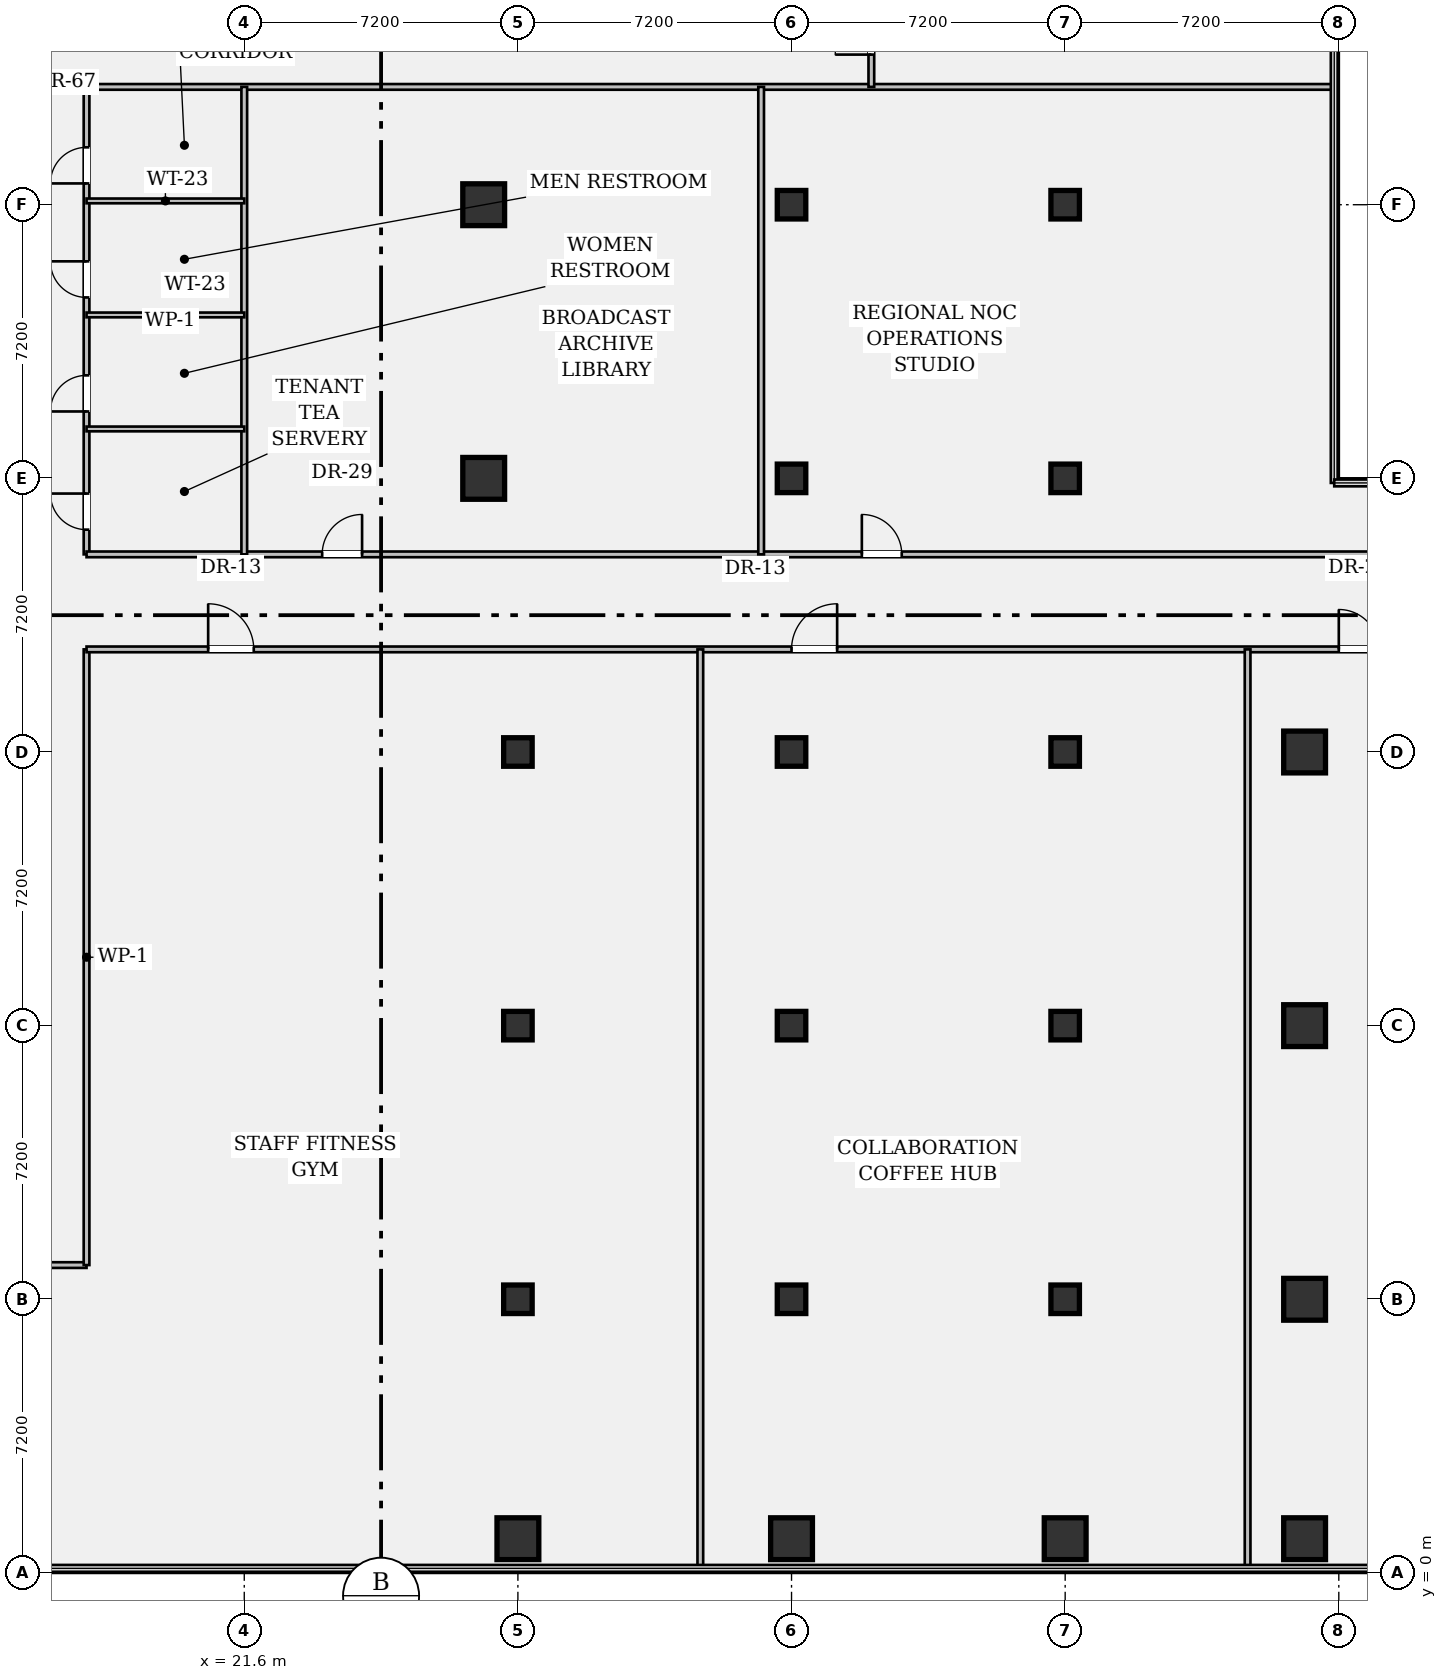
"""IFC4 building model, lengths in metres.
Left out: names, types, materials, properties, quantities, classifications, styles, units other than length and angle.
Written with IfcOpenShell. Run it as: python <this file> out.ifc"""

import sys

from ifc_helpers import new_model, si_unit, direction, frame, frame_2d, origin, origin_2d, place, context, subcontext, project, spatial, rectangle, hollow_rectangle, extrude, element, fill, save


model = new_model("IFC4")
c1 = context("Model", 3, precision=1e-05, world=origin(), true_north=direction((0.0, 1.0)))
c2 = subcontext(c1, "Body", "Model", "MODEL_VIEW")
j1 = project(units=[si_unit("LENGTHUNIT", "METRE"), si_unit("PLANEANGLEUNIT", "RADIAN")], contexts=[c1])
p1 = place(None, origin())
s1 = spatial("IfcSite", under=j1, at=p1, CompositionType="ELEMENT")
p2 = place(p1, origin())
s2 = spatial("IfcBuilding", under=s1, at=p2, CompositionType="ELEMENT")
p3 = place(p2, frame((0.0, 0.0, 17.85)))
s3 = spatial("IfcBuildingStorey", under=s2, at=p3, CompositionType="ELEMENT", Elevation=17.85)
for number, where, z_axis, x_axis in (
    (1, (27.9, 28.8, 0.0), (0.0, 0.0, 1.0), (1.0, 0.0, 0.0)),
    (2, (27.9, 36.0, 0.0), (0.0, 0.0, 1.0), (1.0, 0.0, 0.0)),
    (3, (28.8, 0.9, 0.0), (0.0, 0.0, 1.0), (1.0, 0.0, 0.0)),
):
    element("IfcColumn", number, at=place(p3, frame(where, z_axis=z_axis, x_axis=x_axis)), inside=s3, PredefinedType="COLUMN", context=c2, shape_type="SweptSolid", body=[
        extrude(hollow_rectangle(XDim=1.1, YDim=1.1, WallThickness=0.07, at=origin_2d()), origin(), (0.0, 0.0, 1.0), 3.91),
    ])
for number, where, z_axis, x_axis in (
    (4, (28.8, 7.2, 0.0), (0.0, 0.0, 1.0), (1.0, 0.0, 0.0)),
    (5, (28.8, 14.4, 0.0), (0.0, 0.0, 1.0), (1.0, 0.0, 0.0)),
    (6, (28.8, 21.6, 0.0), (0.0, 0.0, 1.0), (1.0, 0.0, 0.0)),
):
    element("IfcColumn", number, at=place(p3, frame(where, z_axis=z_axis, x_axis=x_axis)), inside=s3, PredefinedType="COLUMN", context=c2, shape_type="SweptSolid", body=[
        extrude(rectangle(XDim=0.75, YDim=0.75, at=origin_2d()), origin(), (0.0, 0.0, 1.0), 3.91),
    ])
p4 = place(p3, frame((36.0, 0.9, 0.0), z_axis=(0.0, 0.0, 1.0), x_axis=(1.0, 0.0, 0.0)))
e7 = element("IfcColumn", 7, at=p4, inside=s3, PredefinedType="COLUMN", context=c2, shape_type="SweptSolid", body=[
    extrude(hollow_rectangle(XDim=1.1, YDim=1.1, WallThickness=0.07, at=origin_2d()), origin(), (0.0, 0.0, 1.0), 3.91),
])
for number, where, z_axis, x_axis in (
    (8, (36.0, 7.2, 0.0), (0.0, 0.0, 1.0), (1.0, 0.0, 0.0)),
    (9, (36.0, 14.4, 0.0), (0.0, 0.0, 1.0), (1.0, 0.0, 0.0)),
    (10, (36.0, 21.6, 0.0), (0.0, 0.0, 1.0), (1.0, 0.0, 0.0)),
    (11, (36.0, 28.8, 0.0), (0.0, 0.0, 1.0), (1.0, 0.0, 0.0)),
    (12, (36.0, 36.0, 0.0), (0.0, 0.0, 1.0), (1.0, 0.0, 0.0)),
):
    element("IfcColumn", number, at=place(p3, frame(where, z_axis=z_axis, x_axis=x_axis)), inside=s3, PredefinedType="COLUMN", context=c2, shape_type="SweptSolid", body=[
        extrude(rectangle(XDim=0.75, YDim=0.75, at=origin_2d()), origin(), (0.0, 0.0, 1.0), 3.91),
    ])
p5 = place(p3, frame((43.2, 0.9, 0.0), z_axis=(0.0, 0.0, 1.0), x_axis=(1.0, 0.0, 0.0)))
e13 = element("IfcColumn", 13, at=p5, inside=s3, PredefinedType="COLUMN", context=c2, shape_type="SweptSolid", body=[
    extrude(hollow_rectangle(XDim=1.1, YDim=1.1, WallThickness=0.07, at=origin_2d()), origin(), (0.0, 0.0, 1.0), 3.91),
])
for number, where, z_axis, x_axis in (
    (14, (43.2, 7.2, 0.0), (0.0, 0.0, 1.0), (1.0, 0.0, 0.0)),
    (15, (43.2, 14.4, 0.0), (0.0, 0.0, 1.0), (1.0, 0.0, 0.0)),
    (16, (43.2, 21.6, 0.0), (0.0, 0.0, 1.0), (1.0, 0.0, 0.0)),
    (17, (43.2, 28.8, 0.0), (0.0, 0.0, 1.0), (1.0, 0.0, 0.0)),
    (18, (43.2, 36.0, 0.0), (0.0, 0.0, 1.0), (1.0, 0.0, 0.0)),
):
    element("IfcColumn", number, at=place(p3, frame(where, z_axis=z_axis, x_axis=x_axis)), inside=s3, PredefinedType="COLUMN", context=c2, shape_type="SweptSolid", body=[
        extrude(rectangle(XDim=0.75, YDim=0.75, at=origin_2d()), origin(), (0.0, 0.0, 1.0), 3.91),
    ])
for number, where, z_axis, x_axis in (
    (19, (49.5, 0.9, 0.0), (0.0, 0.0, 1.0), (1.0, 0.0, 0.0)),
    (20, (49.5, 7.2, 0.0), (0.0, 0.0, 1.0), (1.0, 0.0, 0.0)),
    (21, (49.5, 14.4, 0.0), (0.0, 0.0, 1.0), (1.0, 0.0, 0.0)),
    (22, (49.5, 21.6, 0.0), (0.0, 0.0, 1.0), (1.0, 0.0, 0.0)),
):
    element("IfcColumn", number, at=place(p3, frame(where, z_axis=z_axis, x_axis=x_axis)), inside=s3, PredefinedType="COLUMN", context=c2, shape_type="SweptSolid", body=[
        extrude(hollow_rectangle(XDim=1.1, YDim=1.1, WallThickness=0.07, at=origin_2d()), origin(), (0.0, 0.0, 1.0), 3.91),
    ])
p6 = place(p3, frame((14.4, 8.1, 0.0), z_axis=(0.0, 0.0, 1.0), x_axis=(1.0, 0.0, 0.0)))
e23 = element("IfcWall", 23, at=p6, inside=s3, PredefinedType="PARTITIONING", context=c2, shape_type="SweptSolid", body=[
    extrude(rectangle(XDim=3.05, YDim=0.15, at=frame_2d((1.525, 0.0))), origin(), (0.0, 0.0, 1.0), 2.968),
])
p7 = place(p6, frame((0.9, 0.0, 0.0)))
e24 = element("IfcOpeningElement", 24, at=p7, cuts=e23, PredefinedType="OPENING", context=c2, shape_type="SweptSolid", body=[
    extrude(rectangle(XDim=1.0, YDim=2.15, at=frame_2d((0.5, 1.075))), frame((0.0, 0.087, 0.0), z_axis=(0.0, -1.0, 0.0), x_axis=(1.0, 0.0, 0.0)), (0.0, 0.0, 1.0), 0.174),
])
p8 = place(p3, frame((17.45, 8.1, 0.0), z_axis=(0.0, 0.0, 1.0), x_axis=(0.0, 1.0, 0.0)))
e25 = element("IfcWall", 25, at=p8, inside=s3, PredefinedType="PARTITIONING", context=c2, shape_type="SweptSolid", body=[
    extrude(rectangle(XDim=16.2, YDim=0.15, at=frame_2d((8.1, 0.0))), origin(), (0.0, 0.0, 1.0), 2.968),
])
p9 = place(p3, frame((17.45, 26.8, 0.0), z_axis=(0.0, 0.0, 1.0), x_axis=(0.0, 1.0, 0.0)))
e26 = element("IfcWall", 26, at=p9, inside=s3, PredefinedType="PARTITIONING", context=c2, shape_type="SweptSolid", body=[
    extrude(rectangle(XDim=12.3, YDim=0.15, at=frame_2d((6.15, 0.0))), origin(), (0.0, 0.0, 1.0), 2.968),
])
p10 = place(p9, frame((9.76, 0.0, 0.0)))
e27 = element("IfcOpeningElement", 27, at=p10, cuts=e26, PredefinedType="OPENING", context=c2, shape_type="SweptSolid", body=[
    extrude(rectangle(XDim=0.95, YDim=2.15, at=frame_2d((0.475, 1.075))), frame((0.0, 0.087, 0.0), z_axis=(0.0, -1.0, 0.0), x_axis=(1.0, 0.0, 0.0)), (0.0, 0.0, 1.0), 0.174),
])
p11 = place(p9, frame((6.76, 0.0, 0.0)))
e28 = element("IfcOpeningElement", 28, at=p11, cuts=e26, PredefinedType="OPENING", context=c2, shape_type="SweptSolid", body=[
    extrude(rectangle(XDim=0.95, YDim=2.15, at=frame_2d((0.475, 1.075))), frame((0.0, 0.087, 0.0), z_axis=(0.0, -1.0, 0.0), x_axis=(1.0, 0.0, 0.0)), (0.0, 0.0, 1.0), 0.174),
])
p12 = place(p9, frame((3.76, 0.0, 0.0)))
e29 = element("IfcOpeningElement", 29, at=p12, cuts=e26, PredefinedType="OPENING", context=c2, shape_type="SweptSolid", body=[
    extrude(rectangle(XDim=0.95, YDim=2.15, at=frame_2d((0.475, 1.075))), frame((0.0, 0.087, 0.0), z_axis=(0.0, -1.0, 0.0), x_axis=(1.0, 0.0, 0.0)), (0.0, 0.0, 1.0), 0.174),
])
p13 = place(p9, frame((0.65, 0.0, 0.0)))
e30 = element("IfcOpeningElement", 30, at=p13, cuts=e26, PredefinedType="OPENING", context=c2, shape_type="SweptSolid", body=[
    extrude(rectangle(XDim=0.95, YDim=2.15, at=frame_2d((0.475, 1.075))), frame((0.0, 0.087, 0.0), z_axis=(0.0, -1.0, 0.0), x_axis=(1.0, 0.0, 0.0)), (0.0, 0.0, 1.0), 0.174),
])
p14 = place(p3, frame((17.45, 39.1, 0.0), z_axis=(0.0, 0.0, 1.0), x_axis=(1.0, 0.0, 0.0)))
e31 = element("IfcWall", 31, at=p14, inside=s3, PredefinedType="PARTITIONING", context=c2, shape_type="SweptSolid", body=[
    extrude(rectangle(XDim=32.83, YDim=0.15, at=frame_2d((16.415, 0.0))), origin(), (0.0, 0.0, 1.0), 2.968),
])
p15 = place(p3, frame((38.1, 39.1, 0.0), z_axis=(0.0, 0.0, 1.0), x_axis=(0.0, 1.0, 0.0)))
e32 = element("IfcWall", 32, at=p15, inside=s3, PredefinedType="PARTITIONING", context=c2, shape_type="SweptSolid", body=[
    extrude(rectangle(XDim=11.18, YDim=0.15, at=frame_2d((5.59, 0.0))), origin(), (0.0, 0.0, 1.0), 2.968),
])
p16 = place(p15, frame((0.85, 0.0, 0.0)))
e33 = element("IfcOpeningElement", 33, at=p16, cuts=e32, PredefinedType="OPENING", context=c2, shape_type="SweptSolid", body=[
    extrude(rectangle(XDim=0.95, YDim=2.15, at=frame_2d((0.475, 1.075))), frame((0.0, 0.087, 0.0), z_axis=(0.0, -1.0, 0.0), x_axis=(1.0, 0.0, 0.0)), (0.0, 0.0, 1.0), 0.174),
])
p17 = place(p3, frame((17.45, 24.3, 0.0), z_axis=(0.0, 0.0, 1.0), x_axis=(1.0, 0.0, 0.0)))
e34 = element("IfcWall", 34, at=p17, inside=s3, PredefinedType="PARTITIONING", context=c2, shape_type="SweptSolid", body=[
    extrude(rectangle(XDim=43.55, YDim=0.15, at=frame_2d((21.775, 0.0))), origin(), (0.0, 0.0, 1.0), 2.968),
])
p18 = place(p17, frame((3.2, 0.0, 0.0)))
e35 = element("IfcOpeningElement", 35, at=p18, cuts=e34, PredefinedType="OPENING", context=c2, shape_type="SweptSolid", body=[
    extrude(rectangle(XDim=1.2, YDim=2.15, at=frame_2d((0.6, 1.075))), frame((0.0, 0.087, 0.0), z_axis=(0.0, -1.0, 0.0), x_axis=(1.0, 0.0, 0.0)), (0.0, 0.0, 1.0), 0.174),
])
p19 = place(p17, frame((18.55, 0.0, 0.0)))
e36 = element("IfcOpeningElement", 36, at=p19, cuts=e34, PredefinedType="OPENING", context=c2, shape_type="SweptSolid", body=[
    extrude(rectangle(XDim=1.2, YDim=2.15, at=frame_2d((0.6, 1.075))), frame((0.0, 0.087, 0.0), z_axis=(0.0, -1.0, 0.0), x_axis=(1.0, 0.0, 0.0)), (0.0, 0.0, 1.0), 0.174),
])
p20 = place(p17, frame((32.95, 0.0, 0.0)))
e37 = element("IfcOpeningElement", 37, at=p20, cuts=e34, PredefinedType="OPENING", context=c2, shape_type="SweptSolid", body=[
    extrude(rectangle(XDim=1.05, YDim=2.15, at=frame_2d((0.525, 1.075))), frame((0.0, 0.087, 0.0), z_axis=(0.0, -1.0, 0.0), x_axis=(1.0, 0.0, 0.0)), (0.0, 0.0, 1.0), 0.174),
])
p21 = place(p3, frame((17.45, 26.8, 0.0), z_axis=(0.0, 0.0, 1.0), x_axis=(1.0, 0.0, 0.0)))
e38 = element("IfcWall", 38, at=p21, inside=s3, PredefinedType="PARTITIONING", context=c2, shape_type="SweptSolid", body=[
    extrude(rectangle(XDim=68.83, YDim=0.15, at=frame_2d((34.415, 0.0))), origin(), (0.0, 0.0, 1.0), 2.968),
])
p22 = place(p21, frame((6.2, 0.0, 0.0)))
e39 = element("IfcOpeningElement", 39, at=p22, cuts=e38, PredefinedType="OPENING", context=c2, shape_type="SweptSolid", body=[
    extrude(rectangle(XDim=1.05, YDim=2.15, at=frame_2d((0.525, 1.075))), frame((0.0, 0.087, 0.0), z_axis=(0.0, -1.0, 0.0), x_axis=(1.0, 0.0, 0.0)), (0.0, 0.0, 1.0), 0.174),
])
p23 = place(p21, frame((20.4, 0.0, 0.0)))
e40 = element("IfcOpeningElement", 40, at=p23, cuts=e38, PredefinedType="OPENING", context=c2, shape_type="SweptSolid", body=[
    extrude(rectangle(XDim=1.05, YDim=2.15, at=frame_2d((0.525, 1.075))), frame((0.0, 0.087, 0.0), z_axis=(0.0, -1.0, 0.0), x_axis=(1.0, 0.0, 0.0)), (0.0, 0.0, 1.0), 0.174),
])
p24 = place(p3, frame((21.6, 26.8, 0.0), z_axis=(0.0, 0.0, 1.0), x_axis=(0.0, 1.0, 0.0)))
e41 = element("IfcWall", 41, at=p24, inside=s3, PredefinedType="PARTITIONING", context=c2, shape_type="SweptSolid", body=[
    extrude(rectangle(XDim=12.3, YDim=0.15, at=frame_2d((6.15, 0.0))), origin(), (0.0, 0.0, 1.0), 2.968),
])
p25 = place(p3, frame((17.45, 36.1, 0.0), z_axis=(0.0, 0.0, 1.0), x_axis=(1.0, 0.0, 0.0)))
e42 = element("IfcWall", 42, at=p25, inside=s3, PredefinedType="PARTITIONING", context=c2, shape_type="SweptSolid", body=[
    extrude(rectangle(XDim=4.15, YDim=0.125, at=frame_2d((2.075, 0.0))), origin(), (0.0, 0.0, 1.0), 2.968),
])
for number, where, z_axis, x_axis in (
    (43, (17.45, 33.1, 0.0), (0.0, 0.0, 1.0), (1.0, 0.0, 0.0)),
    (44, (17.45, 30.1, 0.0), (0.0, 0.0, 1.0), (1.0, 0.0, 0.0)),
):
    element("IfcWall", number, at=place(p3, frame(where, z_axis=z_axis, x_axis=x_axis)), inside=s3, PredefinedType="PARTITIONING", context=c2, shape_type="SweptSolid", body=[
        extrude(rectangle(XDim=4.15, YDim=0.125, at=frame_2d((2.075, 0.0))), origin(), (0.0, 0.0, 1.0), 3.428),
    ])
for number, where, z_axis, x_axis in (
    (45, (33.6, 0.12, 0.0), (0.0, 0.0, 1.0), (0.0, 1.0, 0.0)),
    (46, (48.0, 0.12, 0.0), (0.0, 0.0, 1.0), (0.0, 1.0, 0.0)),
):
    element("IfcWall", number, at=place(p3, frame(where, z_axis=z_axis, x_axis=x_axis)), inside=s3, PredefinedType="PARTITIONING", context=c2, shape_type="SweptSolid", body=[
        extrude(rectangle(XDim=24.18, YDim=0.15, at=frame_2d((12.09, 0.0))), origin(), (0.0, 0.0, 1.0), 2.968),
    ])
p26 = place(p3, frame((35.2, 26.8, 0.0), z_axis=(0.0, 0.0, 1.0), x_axis=(0.0, 1.0, 0.0)))
e47 = element("IfcWall", 47, at=p26, inside=s3, PredefinedType="PARTITIONING", context=c2, shape_type="SweptSolid", body=[
    extrude(rectangle(XDim=12.3, YDim=0.15, at=frame_2d((6.15, 0.0))), origin(), (0.0, 0.0, 1.0), 2.968),
])
p27 = place(p10, origin())
e48 = element("IfcDoor", 48, at=p27, inside=s3, OperationType="SINGLE_SWING_LEFT", PredefinedType="DOOR", context=c2, shape_type="SweptSolid", body=[
    extrude(rectangle(XDim=0.95, YDim=2.15, at=frame_2d((0.475, 1.075))), frame((0.0, 0.025, 0.0), z_axis=(0.0, -1.0, 0.0), x_axis=(1.0, 0.0, 0.0)), (0.0, 0.0, 1.0), 0.05),
])
fill(e27, e48)
p28 = place(p11, origin())
e49 = element("IfcDoor", 49, at=p28, inside=s3, OperationType="SINGLE_SWING_RIGHT", PredefinedType="DOOR", context=c2, shape_type="SweptSolid", body=[
    extrude(rectangle(XDim=0.95, YDim=2.15, at=frame_2d((0.475, 1.075))), frame((0.0, 0.025, 0.0), z_axis=(0.0, -1.0, 0.0), x_axis=(1.0, 0.0, 0.0)), (0.0, 0.0, 1.0), 0.05),
])
fill(e28, e49)
p29 = place(p12, origin())
e50 = element("IfcDoor", 50, at=p29, inside=s3, OperationType="SINGLE_SWING_LEFT", PredefinedType="DOOR", context=c2, shape_type="SweptSolid", body=[
    extrude(rectangle(XDim=0.95, YDim=2.15, at=frame_2d((0.475, 1.075))), frame((0.0, 0.025, 0.0), z_axis=(0.0, -1.0, 0.0), x_axis=(1.0, 0.0, 0.0)), (0.0, 0.0, 1.0), 0.05),
])
fill(e29, e50)
p30 = place(p13, origin())
e51 = element("IfcDoor", 51, at=p30, inside=s3, OperationType="SINGLE_SWING_RIGHT", PredefinedType="DOOR", context=c2, shape_type="SweptSolid", body=[
    extrude(rectangle(XDim=0.95, YDim=2.15, at=frame_2d((0.475, 1.075))), frame((0.0, 0.025, 0.0), z_axis=(0.0, -1.0, 0.0), x_axis=(1.0, 0.0, 0.0)), (0.0, 0.0, 1.0), 0.05),
])
fill(e30, e51)
p31 = place(p18, origin())
e52 = element("IfcDoor", 52, at=p31, inside=s3, OperationType="SINGLE_SWING_LEFT", PredefinedType="DOOR", context=c2, shape_type="SweptSolid", body=[
    extrude(rectangle(XDim=1.2, YDim=2.15, at=frame_2d((0.6, 1.075))), frame((0.0, 0.025, 0.0), z_axis=(0.0, -1.0, 0.0), x_axis=(1.0, 0.0, 0.0)), (0.0, 0.0, 1.0), 0.05),
])
fill(e35, e52)
p32 = place(p19, origin())
e53 = element("IfcDoor", 53, at=p32, inside=s3, OperationType="SINGLE_SWING_RIGHT", PredefinedType="DOOR", context=c2, shape_type="SweptSolid", body=[
    extrude(rectangle(XDim=1.2, YDim=2.15, at=frame_2d((0.6, 1.075))), frame((0.0, 0.025, 0.0), z_axis=(0.0, -1.0, 0.0), x_axis=(1.0, 0.0, 0.0)), (0.0, 0.0, 1.0), 0.05),
])
fill(e36, e53)
p33 = place(p20, origin())
e54 = element("IfcDoor", 54, at=p33, inside=s3, OperationType="SINGLE_SWING_LEFT", PredefinedType="DOOR", context=c2, shape_type="SweptSolid", body=[
    extrude(rectangle(XDim=1.05, YDim=2.15, at=frame_2d((0.525, 1.075))), frame((0.0, 0.025, 0.0), z_axis=(0.0, -1.0, 0.0), x_axis=(1.0, 0.0, 0.0)), (0.0, 0.0, 1.0), 0.05),
])
fill(e37, e54)
p34 = place(p22, origin())
e55 = element("IfcDoor", 55, at=p34, inside=s3, OperationType="SINGLE_SWING_RIGHT", PredefinedType="DOOR", context=c2, shape_type="SweptSolid", body=[
    extrude(rectangle(XDim=1.05, YDim=2.15, at=frame_2d((0.525, 1.075))), frame((0.0, 0.025, 0.0), z_axis=(0.0, -1.0, 0.0), x_axis=(1.0, 0.0, 0.0)), (0.0, 0.0, 1.0), 0.05),
])
fill(e39, e55)
p35 = place(p23, origin())
e56 = element("IfcDoor", 56, at=p35, inside=s3, OperationType="SINGLE_SWING_LEFT", PredefinedType="DOOR", context=c2, shape_type="SweptSolid", body=[
    extrude(rectangle(XDim=1.05, YDim=2.15, at=frame_2d((0.525, 1.075))), frame((0.0, 0.025, 0.0), z_axis=(0.0, -1.0, 0.0), x_axis=(1.0, 0.0, 0.0)), (0.0, 0.0, 1.0), 0.05),
])
fill(e40, e56)
p36 = place(p16, origin())
e57 = element("IfcDoor", 57, at=p36, inside=s3, OperationType="SINGLE_SWING_LEFT", PredefinedType="DOOR", context=c2, shape_type="SweptSolid", body=[
    extrude(rectangle(XDim=0.95, YDim=2.15, at=frame_2d((0.475, 1.075))), frame((0.0, 0.025, 0.0), z_axis=(0.0, -1.0, 0.0), x_axis=(1.0, 0.0, 0.0)), (0.0, 0.0, 1.0), 0.05),
])
fill(e33, e57)
save(model, sys.argv[1])
